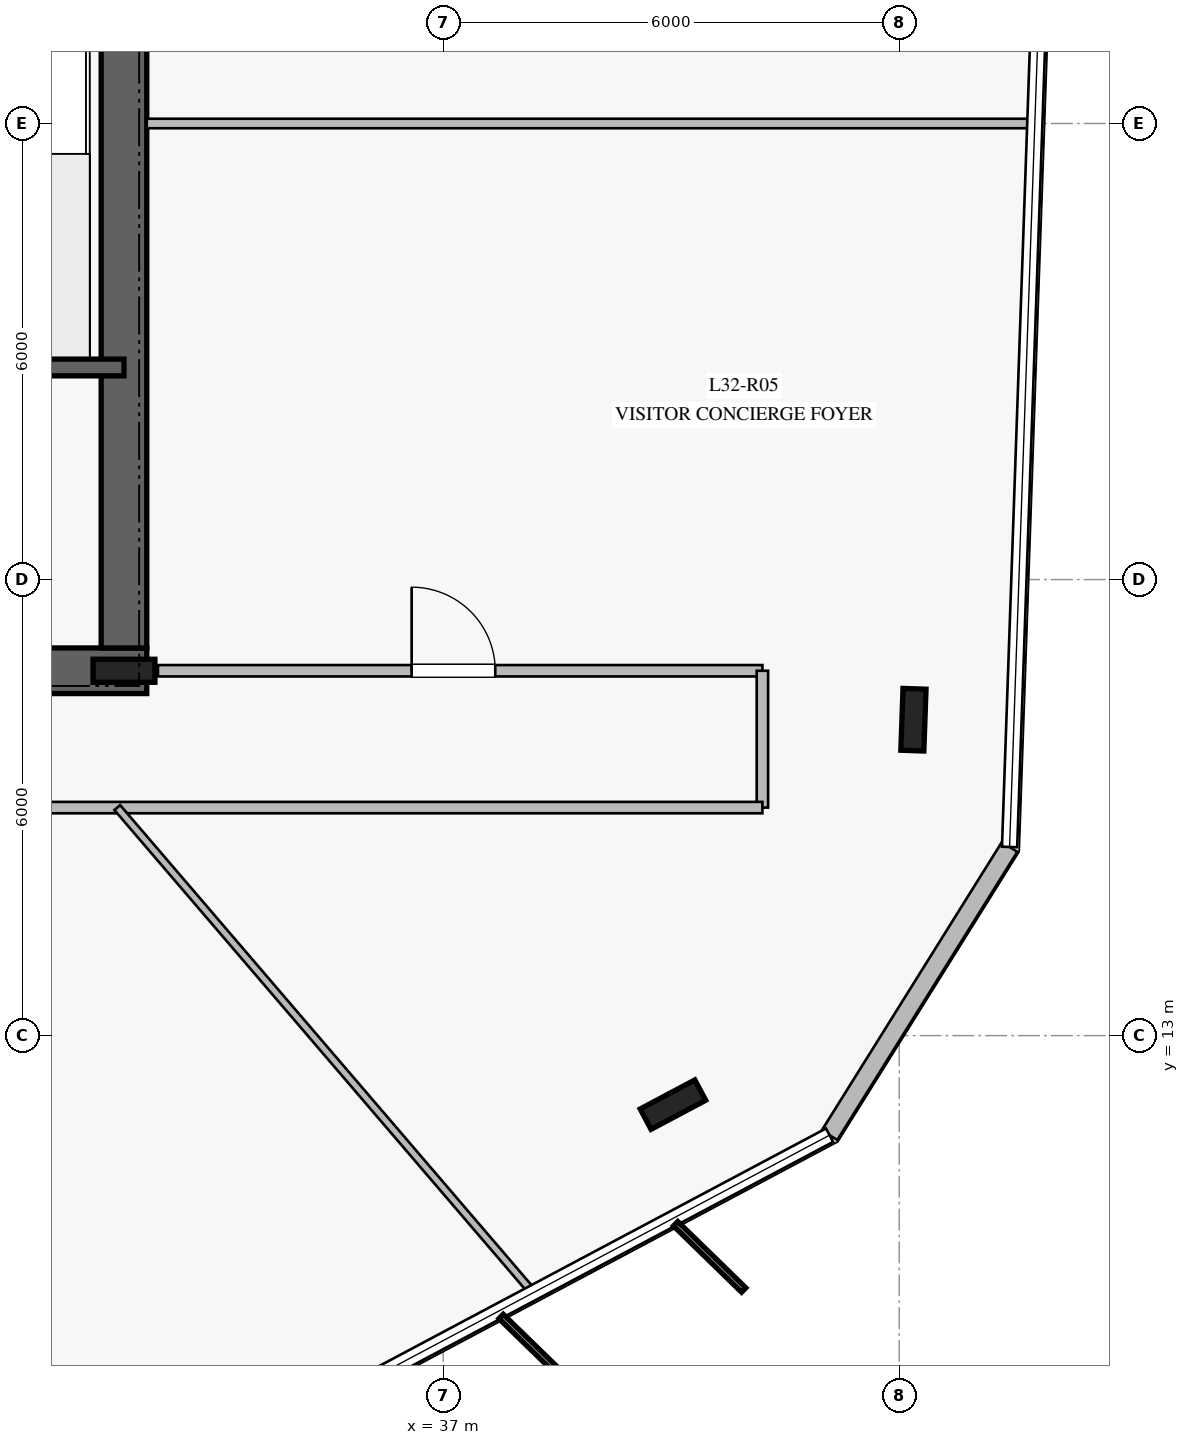
"""IFC4 building model, lengths in metres.
Left out: names, types, materials, properties, quantities, classifications, styles, units other than length and angle.
Written with IfcOpenShell. Run it as: python <this file> out.ifc"""

import sys

from ifc_helpers import new_model, si_unit, direction, frame, frame_2d, origin, origin_2d, place, context, subcontext, project, spatial, rectangle, i_section, extrude, element, fill, save


model = new_model("IFC4")
c1 = context("Model", 3, precision=1e-05, world=origin(), true_north=direction((0.0, 1.0)))
c2 = subcontext(c1, "Body", "Model", "MODEL_VIEW")
j1 = project(units=[si_unit("LENGTHUNIT", "METRE"), si_unit("PLANEANGLEUNIT", "RADIAN")], contexts=[c1])
p1 = place(None, origin())
s1 = spatial("IfcSite", under=j1, at=p1, CompositionType="ELEMENT")
p2 = place(p1, origin())
s2 = spatial("IfcBuilding", under=s1, at=p2, CompositionType="ELEMENT")
p3 = place(p2, frame((0.0, 0.0, 134.4)))
s3 = spatial("IfcBuildingStorey", under=s2, at=p3, CompositionType="ELEMENT", Elevation=134.4)
p4 = place(p3, frame((16.9, 17.8, 0.0), z_axis=(0.0, 0.0, 1.0), x_axis=(1.0, 0.0, 0.0)))
e1 = element("IfcWall", 1, at=p4, inside=s3, PredefinedType="SHEAR", context=c2, shape_type="SweptSolid", body=[
    extrude(rectangle(XDim=16.2, YDim=0.6, at=frame_2d((8.1, 0.0))), origin(), (0.0, 0.0, 1.0), 3.76),
])
p5 = place(p4, frame((5.05, 0.0, 0.0)))
e2 = element("IfcOpeningElement", 2, at=p5, cuts=e1, PredefinedType="OPENING", context=c2, shape_type="SweptSolid", body=[
    extrude(rectangle(XDim=1.2, YDim=2.25, at=frame_2d((0.6, 1.125))), frame((0.0, 0.31, 0.0), z_axis=(0.0, -1.0, 0.0), x_axis=(1.0, 0.0, 0.0)), (0.0, 0.0, 1.0), 0.62),
])
p6 = place(p4, frame((14.0, 0.0, 0.0)))
e3 = element("IfcOpeningElement", 3, at=p6, cuts=e1, PredefinedType="OPENING", context=c2, shape_type="SweptSolid", body=[
    extrude(rectangle(XDim=0.9, YDim=2.1, at=frame_2d((0.45, 1.05))), frame((0.0, 0.31, 0.0), z_axis=(0.0, -1.0, 0.0), x_axis=(1.0, 0.0, 0.0)), (0.0, 0.0, 1.0), 0.62),
])
p7 = place(p4, frame((9.875, 0.0, 0.0)))
e4 = element("IfcOpeningElement", 4, at=p7, cuts=e1, PredefinedType="OPENING", context=c2, shape_type="SweptSolid", body=[
    extrude(rectangle(XDim=1.1, YDim=2.2, at=frame_2d((0.55, 1.1))), frame((0.0, 0.31, 0.0), z_axis=(0.0, -1.0, 0.0), x_axis=(1.0, 0.0, 0.0)), (0.0, 0.0, 1.0), 0.62),
])
p8 = place(p3, frame((32.8, 18.1, 0.0), z_axis=(0.0, 0.0, 1.0), x_axis=(0.0, 1.0, 0.0)))
e5 = element("IfcWall", 5, at=p8, inside=s3, PredefinedType="SHEAR", context=c2, shape_type="SweptSolid", body=[
    extrude(rectangle(XDim=13.8, YDim=0.6, at=frame_2d((6.9, 0.0))), origin(), (0.0, 0.0, 1.0), 3.76),
])
p9 = place(p3, frame((32.8, 17.8, 0.0), z_axis=(0.0, 0.0, 1.0), x_axis=(1.0, 0.0, 0.0)))
e6 = element("IfcColumn", 6, at=p9, inside=s3, PredefinedType="COLUMN", context=c2, shape_type="SweptSolid", body=[
    extrude(i_section(OverallWidth=0.303, OverallDepth=0.814, WebThickness=0.021, FlangeThickness=0.04, at=origin_2d()), origin(), (0.0, 0.0, 1.0), 4.0),
])
p10 = place(p3, frame((29.08, 21.79, 0.0), z_axis=(0.0, 0.0, 1.0), x_axis=(1.0, 0.0, 0.0)))
e7 = element("IfcWall", 7, at=p10, inside=s3, PredefinedType="SOLIDWALL", context=c2, shape_type="SweptSolid", body=[
    extrude(rectangle(XDim=3.72, YDim=0.22, at=frame_2d((1.86, 0.0))), origin(), (0.0, 0.0, 1.0), 3.76),
])
for number, where, z_axis, x_axis in (
    (8, (40.023, 12.092, 0.0), (0.0, 0.0, 1.0), (0.883, 0.469, 0.0)),
    (9, (43.187, 17.156, 0.0), (0.0, 0.0, 1.0), (0.035, 0.999, 0.0)),
):
    element("IfcColumn", number, at=place(p3, frame(where, z_axis=z_axis, x_axis=x_axis)), inside=s3, PredefinedType="COLUMN", context=c2, shape_type="SweptSolid", body=[
        extrude(i_section(OverallWidth=0.303, OverallDepth=0.814, WebThickness=0.021, FlangeThickness=0.04, at=origin_2d()), origin(), (0.0, 0.0, 1.0), 4.0),
    ])
p11 = place(p3, frame((42.083, 11.69, 0.0), z_axis=(0.0, 0.0, 1.0), x_axis=(0.529822232534, 0.848108720573, 0.0)))
e10 = element("IfcWall", 10, at=p11, inside=s3, PredefinedType="STANDARD", context=c2, shape_type="SweptSolid", body=[
    extrude(rectangle(XDim=4.471, YDim=0.24, at=frame_2d((2.236, 0.0))), origin(), (0.0, 0.0, 1.0), 3.76),
])
p12 = place(p3, frame((33.247, 17.8, 0.0), z_axis=(0.0, 0.0, 1.0), x_axis=(1.0, 0.0, 0.0)))
e11 = element("IfcWall", 11, at=p12, inside=s3, PredefinedType="PARTITIONING", context=c2, shape_type="SweptSolid", body=[
    extrude(rectangle(XDim=7.953, YDim=0.15, at=frame_2d((3.977, 0.0))), origin(), (0.0, 0.0, 1.0), 3.21),
])
p13 = place(p12, frame((3.338, 0.0, 0.0)))
e12 = element("IfcOpeningElement", 12, at=p13, cuts=e11, PredefinedType="OPENING", context=c2, shape_type="SweptSolid", body=[
    extrude(rectangle(XDim=1.1, YDim=2.2, at=frame_2d((0.55, 1.1))), frame((0.0, 0.085, 0.0), z_axis=(0.0, -1.0, 0.0), x_axis=(1.0, 0.0, 0.0)), (0.0, 0.0, 1.0), 0.17),
])
p14 = place(p3, frame((41.2, 17.8, 0.0), z_axis=(0.0, 0.0, 1.0), x_axis=(0.0, -1.0, 0.0)))
e13 = element("IfcWall", 13, at=p14, inside=s3, PredefinedType="PARTITIONING", context=c2, shape_type="SweptSolid", body=[
    extrude(rectangle(XDim=1.8, YDim=0.15, at=frame_2d((0.9, 0.0))), origin(), (0.0, 0.0, 1.0), 3.21),
])
p15 = place(p3, frame((41.2, 16.0, 0.0), z_axis=(0.0, 0.0, 1.0), x_axis=(-1.0, 0.0, 0.0)))
e14 = element("IfcWall", 14, at=p15, inside=s3, PredefinedType="PARTITIONING", context=c2, shape_type="SweptSolid", body=[
    extrude(rectangle(XDim=15.25, YDim=0.15, at=frame_2d((7.625, 0.0))), origin(), (0.0, 0.0, 1.0), 3.21),
])
p16 = place(p15, frame((11.01, 0.0, 0.0)))
e15 = element("IfcOpeningElement", 15, at=p16, cuts=e14, PredefinedType="OPENING", context=c2, shape_type="SweptSolid", body=[
    extrude(rectangle(XDim=1.1, YDim=2.2, at=frame_2d((0.55, 1.1))), frame((0.0, 0.085, 0.0), z_axis=(0.0, -1.0, 0.0), x_axis=(1.0, 0.0, 0.0)), (0.0, 0.0, 1.0), 0.17),
])
p17 = place(p3, frame((32.712, 16.0, 0.0), z_axis=(0.0, 0.0, 1.0), x_axis=(0.650714678519, -0.759322334164, 0.0)))
e16 = element("IfcWall", 16, at=p17, inside=s3, PredefinedType="MOVABLE", context=c2, shape_type="SweptSolid", body=[
    extrude(rectangle(XDim=8.389, YDim=0.1, at=frame_2d((4.195, 0.0))), origin(), (0.0, 0.0, 1.0), 3.05),
])
p18 = place(p3, frame((33.1, 25.0, 0.0), z_axis=(0.0, 0.0, 1.0), x_axis=(1.0, 0.0, 0.0)))
e17 = element("IfcWall", 17, at=p18, inside=s3, PredefinedType="PARTITIONING", context=c2, shape_type="SweptSolid", body=[
    extrude(rectangle(XDim=11.667, YDim=0.125, at=frame_2d((5.833, 0.0))), origin(), (0.0, 0.0, 1.0), 3.16),
])
p19 = place(p13, origin())
e18 = element("IfcDoor", 18, at=p19, inside=s3, OperationType="SINGLE_SWING_LEFT", PredefinedType="DOOR", context=c2, shape_type="SweptSolid", body=[
    extrude(rectangle(XDim=1.1, YDim=2.2, at=frame_2d((0.55, 1.1))), frame((0.0, 0.025, 0.0), z_axis=(0.0, -1.0, 0.0), x_axis=(1.0, 0.0, 0.0)), (0.0, 0.0, 1.0), 0.05),
])
fill(e12, e18)
save(model, sys.argv[1])
